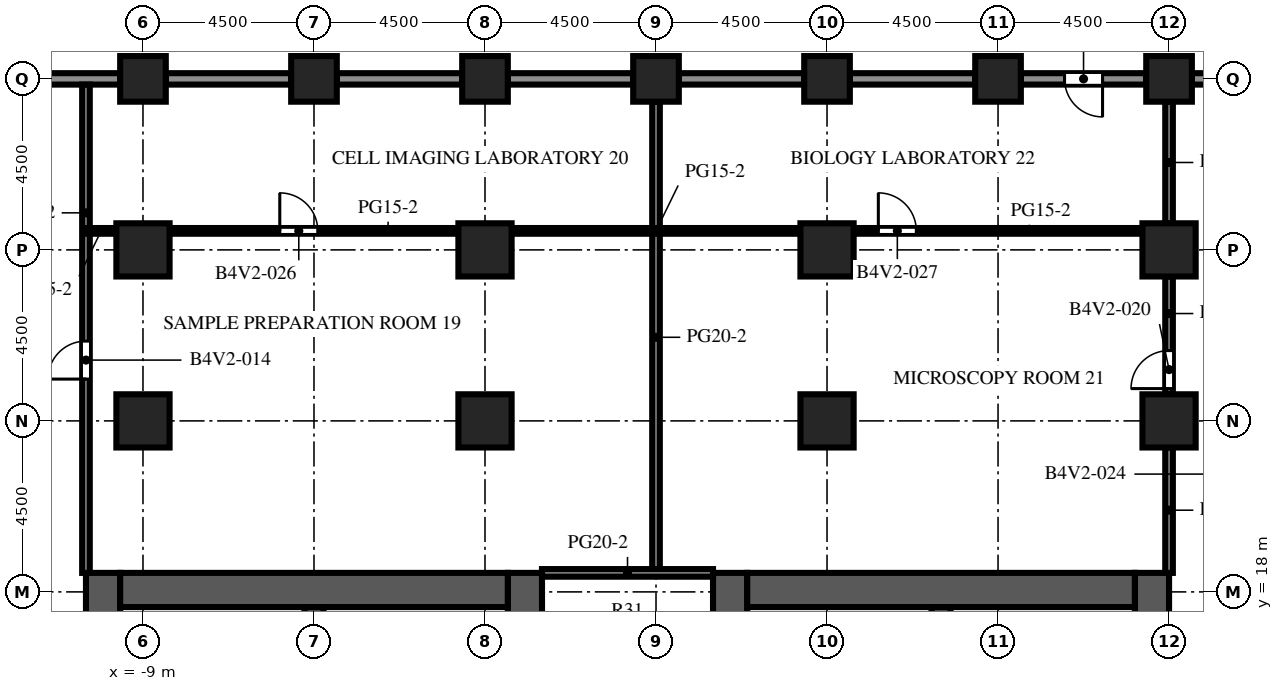
"""IFC4 building model, lengths in metres.
Left out: names, types, materials, properties, quantities, classifications, styles, units other than length and angle.
Written with IfcOpenShell. Run it as: python <this file> out.ifc"""

import sys

from ifc_helpers import new_model, si_unit, direction, frame, frame_2d, origin, origin_2d, place, context, subcontext, project, spatial, rectangle, extrude, element, fill, save


model = new_model("IFC4")
c1 = context("Model", 3, precision=1e-05, world=origin(), true_north=direction((0.0, 1.0)))
c2 = subcontext(c1, "Body", "Model", "MODEL_VIEW")
j1 = project(units=[si_unit("LENGTHUNIT", "METRE"), si_unit("PLANEANGLEUNIT", "RADIAN")], contexts=[c1])
p1 = place(None, origin())
s1 = spatial("IfcSite", under=j1, at=p1, CompositionType="ELEMENT")
p2 = place(p1, origin())
s2 = spatial("IfcBuilding", under=s1, at=p2, CompositionType="ELEMENT")
p3 = place(p2, frame((0.0, 0.0, 141.3)))
s3 = spatial("IfcBuildingStorey", under=s2, at=p3, CompositionType="ELEMENT", Elevation=141.3)
for number, where, z_axis, x_axis in (
    (1, (-9.0, 31.5, 0.0), (0.0, 0.0, 1.0), (1.0, 0.0, 0.0)),
    (2, (-4.5, 31.5, 0.0), (0.0, 0.0, 1.0), (1.0, 0.0, 0.0)),
    (3, (0.0, 31.5, 0.0), (0.0, 0.0, 1.0), (1.0, 0.0, 0.0)),
    (4, (4.5, 31.5, 0.0), (0.0, 0.0, 1.0), (1.0, 0.0, 0.0)),
    (5, (9.0, 31.5, 0.0), (0.0, 0.0, 1.0), (1.0, 0.0, 0.0)),
    (6, (13.5, 31.5, 0.0), (0.0, 0.0, 1.0), (1.0, 0.0, 0.0)),
    (7, (18.0, 31.5, 0.0), (0.0, 0.0, 1.0), (1.0, 0.0, 0.0)),
):
    element("IfcColumn", number, at=place(p3, frame(where, z_axis=z_axis, x_axis=x_axis)), inside=s3, PredefinedType="COLUMN", context=c2, shape_type="SweptSolid", body=[
        extrude(rectangle(XDim=1.2, YDim=1.2, at=origin_2d()), origin(), (0.0, 0.0, 1.0), 4.1),
    ])
for number, where, z_axis, x_axis in (
    (8, (-9.0, 22.5, 0.0), (0.0, 0.0, 1.0), (1.0, 0.0, 0.0)),
    (9, (-9.0, 27.0, 0.0), (0.0, 0.0, 1.0), (1.0, 0.0, 0.0)),
    (10, (0.0, 22.5, 0.0), (0.0, 0.0, 1.0), (1.0, 0.0, 0.0)),
    (11, (0.0, 27.0, 0.0), (0.0, 0.0, 1.0), (1.0, 0.0, 0.0)),
    (12, (9.0, 22.5, 0.0), (0.0, 0.0, 1.0), (1.0, 0.0, 0.0)),
    (13, (9.0, 27.0, 0.0), (0.0, 0.0, 1.0), (1.0, 0.0, 0.0)),
    (14, (18.0, 22.5, 0.0), (0.0, 0.0, 1.0), (1.0, 0.0, 0.0)),
    (15, (18.0, 27.0, 0.0), (0.0, 0.0, 1.0), (1.0, 0.0, 0.0)),
):
    element("IfcColumn", number, at=place(p3, frame(where, z_axis=z_axis, x_axis=x_axis)), inside=s3, PredefinedType="COLUMN", context=c2, shape_type="SweptSolid", body=[
        extrude(rectangle(XDim=1.4, YDim=1.4, at=origin_2d()), origin(), (0.0, 0.0, 1.0), 4.1),
    ])
p4 = place(p3, frame((-10.05, -9.0, 0.0), z_axis=(0.0, 0.0, 1.0), x_axis=(0.0, 1.0, 0.0)))
e16 = element("IfcWall", 16, at=p4, inside=s3, PredefinedType="SHEAR", context=c2, shape_type="SweptSolid", body=[
    extrude(rectangle(XDim=27.5, YDim=0.9, at=frame_2d((13.75, 0.0))), origin(), (0.0, 0.0, 1.0), 4.1),
])
p5 = place(p4, frame((12.55, 0.0, 0.0)))
e17 = element("IfcOpeningElement", 17, at=p5, cuts=e16, PredefinedType="OPENING", context=c2, shape_type="SweptSolid", body=[
    extrude(rectangle(XDim=2.4, YDim=2.4, at=frame_2d((1.2, 1.2))), frame((0.0, 0.46, 0.0), z_axis=(0.0, -1.0, 0.0), x_axis=(1.0, 0.0, 0.0)), (0.0, 0.0, 1.0), 0.92),
])
p6 = place(p4, frame((6.825, 0.0, 0.0)))
e18 = element("IfcOpeningElement", 18, at=p6, cuts=e16, PredefinedType="OPENING", context=c2, shape_type="SweptSolid", body=[
    extrude(rectangle(XDim=1.2, YDim=2.1, at=frame_2d((0.6, 1.05))), frame((0.0, 0.46, 0.0), z_axis=(0.0, -1.0, 0.0), x_axis=(1.0, 0.0, 0.0)), (0.0, 0.0, 1.0), 0.92),
])
p7 = place(p4, frame((19.475, 0.0, 0.0)))
e19 = element("IfcOpeningElement", 19, at=p7, cuts=e16, PredefinedType="OPENING", context=c2, shape_type="SweptSolid", body=[
    extrude(rectangle(XDim=1.2, YDim=2.1, at=frame_2d((0.6, 1.05))), frame((0.0, 0.46, 0.0), z_axis=(0.0, -1.0, 0.0), x_axis=(1.0, 0.0, 0.0)), (0.0, 0.0, 1.0), 0.92),
])
p8 = place(p3, frame((1.05, -9.0, 0.0), z_axis=(0.0, 0.0, 1.0), x_axis=(0.0, 1.0, 0.0)))
e20 = element("IfcWall", 20, at=p8, inside=s3, PredefinedType="SHEAR", context=c2, shape_type="SweptSolid", body=[
    extrude(rectangle(XDim=27.5, YDim=0.9, at=frame_2d((13.75, 0.0))), origin(), (0.0, 0.0, 1.0), 4.1),
])
p9 = place(p8, frame((12.55, 0.0, 0.0)))
e21 = element("IfcOpeningElement", 21, at=p9, cuts=e20, PredefinedType="OPENING", context=c2, shape_type="SweptSolid", body=[
    extrude(rectangle(XDim=2.4, YDim=2.4, at=frame_2d((1.2, 1.2))), frame((0.0, 0.46, 0.0), z_axis=(0.0, -1.0, 0.0), x_axis=(1.0, 0.0, 0.0)), (0.0, 0.0, 1.0), 0.92),
])
p10 = place(p8, frame((5.51, 0.0, 0.0)))
e22 = element("IfcOpeningElement", 22, at=p10, cuts=e20, PredefinedType="OPENING", context=c2, shape_type="SweptSolid", body=[
    extrude(rectangle(XDim=0.923, YDim=2.1, at=frame_2d((0.461, 1.05))), frame((0.0, 0.46, 0.0), z_axis=(0.0, -1.0, 0.0), x_axis=(1.0, 0.0, 0.0)), (0.0, 0.0, 1.0), 0.92),
])
p11 = place(p8, frame((23.427, 0.0, 0.0)))
e23 = element("IfcOpeningElement", 23, at=p11, cuts=e20, PredefinedType="OPENING", context=c2, shape_type="SweptSolid", body=[
    extrude(rectangle(XDim=1.2, YDim=2.1, at=frame_2d((0.6, 1.05))), frame((0.0, 0.46, 0.0), z_axis=(0.0, -1.0, 0.0), x_axis=(1.0, 0.0, 0.0)), (0.0, 0.0, 1.0), 0.92),
])
p12 = place(p3, frame((-9.6, 18.05, 0.0), z_axis=(0.0, 0.0, 1.0), x_axis=(1.0, 0.0, 0.0)))
e24 = element("IfcWall", 24, at=p12, inside=s3, PredefinedType="SHEAR", context=c2, shape_type="SweptSolid", body=[
    extrude(rectangle(XDim=10.2, YDim=0.9, at=frame_2d((5.1, 0.0))), origin(), (0.0, 0.0, 1.0), 4.1),
])
p13 = place(p3, frame((-4.5, 10.25, 0.0), z_axis=(0.0, 0.0, 1.0), x_axis=(0.0, 1.0, 0.0)))
e25 = element("IfcWall", 25, at=p13, inside=s3, PredefinedType="SHEAR", context=c2, shape_type="SweptSolid", body=[
    extrude(rectangle(XDim=7.35, YDim=0.5, at=frame_2d((3.675, 0.0))), origin(), (0.0, 0.0, 1.0), 4.1),
])
p14 = place(p3, frame((6.45, -9.0, 0.0), z_axis=(0.0, 0.0, 1.0), x_axis=(0.0, 1.0, 0.0)))
e26 = element("IfcWall", 26, at=p14, inside=s3, PredefinedType="SHEAR", context=c2, shape_type="SweptSolid", body=[
    extrude(rectangle(XDim=27.5, YDim=0.9, at=frame_2d((13.75, 0.0))), origin(), (0.0, 0.0, 1.0), 4.1),
])
p15 = place(p14, frame((12.55, 0.0, 0.0)))
e27 = element("IfcOpeningElement", 27, at=p15, cuts=e26, PredefinedType="OPENING", context=c2, shape_type="SweptSolid", body=[
    extrude(rectangle(XDim=2.4, YDim=2.4, at=frame_2d((1.2, 1.2))), frame((0.0, 0.46, 0.0), z_axis=(0.0, -1.0, 0.0), x_axis=(1.0, 0.0, 0.0)), (0.0, 0.0, 1.0), 0.92),
])
p16 = place(p14, frame((5.51, 0.0, 0.0)))
e28 = element("IfcOpeningElement", 28, at=p16, cuts=e26, PredefinedType="OPENING", context=c2, shape_type="SweptSolid", body=[
    extrude(rectangle(XDim=0.923, YDim=2.1, at=frame_2d((0.461, 1.05))), frame((0.0, 0.46, 0.0), z_axis=(0.0, -1.0, 0.0), x_axis=(1.0, 0.0, 0.0)), (0.0, 0.0, 1.0), 0.92),
])
p17 = place(p14, frame((23.427, 0.0, 0.0)))
e29 = element("IfcOpeningElement", 29, at=p17, cuts=e26, PredefinedType="OPENING", context=c2, shape_type="SweptSolid", body=[
    extrude(rectangle(XDim=1.2, YDim=2.1, at=frame_2d((0.6, 1.05))), frame((0.0, 0.46, 0.0), z_axis=(0.0, -1.0, 0.0), x_axis=(1.0, 0.0, 0.0)), (0.0, 0.0, 1.0), 0.92),
])
p18 = place(p3, frame((17.55, -9.0, 0.0), z_axis=(0.0, 0.0, 1.0), x_axis=(0.0, 1.0, 0.0)))
e30 = element("IfcWall", 30, at=p18, inside=s3, PredefinedType="SHEAR", context=c2, shape_type="SweptSolid", body=[
    extrude(rectangle(XDim=27.5, YDim=0.9, at=frame_2d((13.75, 0.0))), origin(), (0.0, 0.0, 1.0), 4.1),
])
p19 = place(p18, frame((12.55, 0.0, 0.0)))
e31 = element("IfcOpeningElement", 31, at=p19, cuts=e30, PredefinedType="OPENING", context=c2, shape_type="SweptSolid", body=[
    extrude(rectangle(XDim=2.4, YDim=2.4, at=frame_2d((1.2, 1.2))), frame((0.0, 0.46, 0.0), z_axis=(0.0, -1.0, 0.0), x_axis=(1.0, 0.0, 0.0)), (0.0, 0.0, 1.0), 0.92),
])
p20 = place(p18, frame((6.825, 0.0, 0.0)))
e32 = element("IfcOpeningElement", 32, at=p20, cuts=e30, PredefinedType="OPENING", context=c2, shape_type="SweptSolid", body=[
    extrude(rectangle(XDim=1.2, YDim=2.1, at=frame_2d((0.6, 1.05))), frame((0.0, 0.46, 0.0), z_axis=(0.0, -1.0, 0.0), x_axis=(1.0, 0.0, 0.0)), (0.0, 0.0, 1.0), 0.92),
])
p21 = place(p18, frame((19.475, 0.0, 0.0)))
e33 = element("IfcOpeningElement", 33, at=p21, cuts=e30, PredefinedType="OPENING", context=c2, shape_type="SweptSolid", body=[
    extrude(rectangle(XDim=1.2, YDim=2.1, at=frame_2d((0.6, 1.05))), frame((0.0, 0.46, 0.0), z_axis=(0.0, -1.0, 0.0), x_axis=(1.0, 0.0, 0.0)), (0.0, 0.0, 1.0), 0.92),
])
p22 = place(p3, frame((6.9, 18.05, 0.0), z_axis=(0.0, 0.0, 1.0), x_axis=(1.0, 0.0, 0.0)))
e34 = element("IfcWall", 34, at=p22, inside=s3, PredefinedType="SHEAR", context=c2, shape_type="SweptSolid", body=[
    extrude(rectangle(XDim=10.2, YDim=0.9, at=frame_2d((5.1, 0.0))), origin(), (0.0, 0.0, 1.0), 4.1),
])
p23 = place(p3, frame((12.0, 10.25, 0.0), z_axis=(0.0, 0.0, 1.0), x_axis=(0.0, 1.0, 0.0)))
e35 = element("IfcWall", 35, at=p23, inside=s3, PredefinedType="SHEAR", context=c2, shape_type="SweptSolid", body=[
    extrude(rectangle(XDim=7.35, YDim=0.5, at=frame_2d((3.675, 0.0))), origin(), (0.0, 0.0, 1.0), 4.1),
])
p24 = place(p3, frame((18.6, 31.5, 0.0), z_axis=(0.0, 0.0, 1.0), x_axis=(1.0, 0.0, 0.0)))
e36 = element("IfcWall", 36, at=p24, inside=s3, PredefinedType="SOLIDWALL", context=c2, shape_type="SweptSolid", body=[
    extrude(rectangle(XDim=3.3, YDim=0.3, at=frame_2d((1.65, 0.0))), origin(), (0.0, 0.0, 1.0), 2.6),
])
p25 = place(p3, frame((14.1, 31.5, 0.0), z_axis=(0.0, 0.0, 1.0), x_axis=(1.0, 0.0, 0.0)))
e37 = element("IfcWall", 37, at=p25, inside=s3, PredefinedType="SOLIDWALL", context=c2, shape_type="SweptSolid", body=[
    extrude(rectangle(XDim=3.3, YDim=0.3, at=frame_2d((1.65, 0.0))), origin(), (0.0, 0.0, 1.0), 2.6),
])
p26 = place(p25, frame((1.15, 0.0, 0.0)))
e38 = element("IfcOpeningElement", 38, at=p26, cuts=e37, PredefinedType="OPENING", context=c2, shape_type="SweptSolid", body=[
    extrude(rectangle(XDim=1.0, YDim=2.2, at=frame_2d((0.5, 1.1))), frame((0.0, 0.16, 0.0), z_axis=(0.0, -1.0, 0.0), x_axis=(1.0, 0.0, 0.0)), (0.0, 0.0, 1.0), 0.32),
])
for number, where, z_axis, x_axis in (
    (39, (9.6, 31.5, 0.0), (0.0, 0.0, 1.0), (1.0, 0.0, 0.0)),
    (40, (5.1, 31.5, 0.0), (0.0, 0.0, 1.0), (1.0, 0.0, 0.0)),
    (41, (0.6, 31.5, 0.0), (0.0, 0.0, 1.0), (1.0, 0.0, 0.0)),
    (42, (-3.9, 31.5, 0.0), (0.0, 0.0, 1.0), (1.0, 0.0, 0.0)),
    (43, (-8.4, 31.5, 0.0), (0.0, 0.0, 1.0), (1.0, 0.0, 0.0)),
    (44, (-12.9, 31.5, 0.0), (0.0, 0.0, 1.0), (1.0, 0.0, 0.0)),
):
    element("IfcWall", number, at=place(p3, frame(where, z_axis=z_axis, x_axis=x_axis)), inside=s3, PredefinedType="SOLIDWALL", context=c2, shape_type="SweptSolid", body=[
        extrude(rectangle(XDim=3.3, YDim=0.3, at=frame_2d((1.65, 0.0))), origin(), (0.0, 0.0, 1.0), 2.6),
    ])
p27 = place(p3, frame((-0.7, 15.028, 0.0), z_axis=(0.0, 0.0, 1.0), x_axis=(0.0, 1.0, 0.0)))
e45 = element("IfcWall", 45, at=p27, inside=s3, PredefinedType="PARTITIONING", context=c2, shape_type="SweptSolid", body=[
    extrude(rectangle(XDim=2.573, YDim=0.1, at=frame_2d((1.286, 0.0))), origin(), (0.0, 0.0, 1.0), 3.5),
])
p28 = place(p27, frame((0.786, 0.0, 0.0)))
e46 = element("IfcOpeningElement", 46, at=p28, cuts=e45, PredefinedType="OPENING", context=c2, shape_type="SweptSolid", body=[
    extrude(rectangle(XDim=1.0, YDim=2.1, at=frame_2d((0.5, 1.05))), frame((0.0, 0.06, 0.0), z_axis=(0.0, -1.0, 0.0), x_axis=(1.0, 0.0, 0.0)), (0.0, 0.0, 1.0), 0.12),
])
p29 = place(p3, frame((8.2, 15.028, 0.0), z_axis=(0.0, 0.0, 1.0), x_axis=(0.0, 1.0, 0.0)))
e47 = element("IfcWall", 47, at=p29, inside=s3, PredefinedType="PARTITIONING", context=c2, shape_type="SweptSolid", body=[
    extrude(rectangle(XDim=2.573, YDim=0.1, at=frame_2d((1.286, 0.0))), origin(), (0.0, 0.0, 1.0), 3.5),
])
p30 = place(p29, frame((0.786, 0.0, 0.0)))
e48 = element("IfcOpeningElement", 48, at=p30, cuts=e47, PredefinedType="OPENING", context=c2, shape_type="SweptSolid", body=[
    extrude(rectangle(XDim=1.0, YDim=2.1, at=frame_2d((0.5, 1.05))), frame((0.0, 0.06, 0.0), z_axis=(0.0, -1.0, 0.0), x_axis=(1.0, 0.0, 0.0)), (0.0, 0.0, 1.0), 0.12),
])
p31 = place(p3, frame((-10.5, 31.35, 0.0), z_axis=(0.0, 0.0, 1.0), x_axis=(0.0, -1.0, 0.0)))
e49 = element("IfcWall", 49, at=p31, inside=s3, PredefinedType="PARTITIONING", context=c2, shape_type="SweptSolid", body=[
    extrude(rectangle(XDim=12.85, YDim=0.2, at=frame_2d((6.425, 0.0))), origin(), (0.0, 0.0, 1.0), 3.5),
])
p32 = place(p31, frame((6.75, 0.0, 0.0)))
e50 = element("IfcOpeningElement", 50, at=p32, cuts=e49, PredefinedType="OPENING", context=c2, shape_type="SweptSolid", body=[
    extrude(rectangle(XDim=1.0, YDim=2.1, at=frame_2d((0.5, 1.05))), frame((0.0, 0.11, 0.0), z_axis=(0.0, -1.0, 0.0), x_axis=(1.0, 0.0, 0.0)), (0.0, 0.0, 1.0), 0.22),
])
p33 = place(p3, frame((4.5, 18.5, 0.0), z_axis=(0.0, 0.0, 1.0), x_axis=(0.0, 1.0, 0.0)))
e51 = element("IfcWall", 51, at=p33, inside=s3, PredefinedType="PARTITIONING", context=c2, shape_type="SweptSolid", body=[
    extrude(rectangle(XDim=12.4, YDim=0.2, at=frame_2d((6.2, 0.0))), origin(), (0.0, 0.0, 1.0), 3.5),
])
p34 = place(p3, frame((18.0, 18.5, 0.0), z_axis=(0.0, 0.0, 1.0), x_axis=(0.0, 1.0, 0.0)))
e52 = element("IfcWall", 52, at=p34, inside=s3, PredefinedType="PARTITIONING", context=c2, shape_type="SweptSolid", body=[
    extrude(rectangle(XDim=3.3, YDim=0.2, at=frame_2d((1.65, 0.0))), origin(), (0.0, 0.0, 1.0), 3.5),
])
p35 = place(p3, frame((18.0, 23.2, 0.0), z_axis=(0.0, 0.0, 1.0), x_axis=(0.0, 1.0, 0.0)))
e53 = element("IfcWall", 53, at=p35, inside=s3, PredefinedType="PARTITIONING", context=c2, shape_type="SweptSolid", body=[
    extrude(rectangle(XDim=3.1, YDim=0.2, at=frame_2d((1.55, 0.0))), origin(), (0.0, 0.0, 1.0), 3.5),
])
p36 = place(p35, frame((0.15, 0.0, 0.0)))
e54 = element("IfcOpeningElement", 54, at=p36, cuts=e53, PredefinedType="OPENING", context=c2, shape_type="SweptSolid", body=[
    extrude(rectangle(XDim=1.0, YDim=2.1, at=frame_2d((0.5, 1.05))), frame((0.0, 0.11, 0.0), z_axis=(0.0, -1.0, 0.0), x_axis=(1.0, 0.0, 0.0)), (0.0, 0.0, 1.0), 0.22),
])
p37 = place(p3, frame((18.0, 27.7, 0.0), z_axis=(0.0, 0.0, 1.0), x_axis=(0.0, 1.0, 0.0)))
e55 = element("IfcWall", 55, at=p37, inside=s3, PredefinedType="PARTITIONING", context=c2, shape_type="SweptSolid", body=[
    extrude(rectangle(XDim=3.2, YDim=0.2, at=frame_2d((1.6, 0.0))), origin(), (0.0, 0.0, 1.0), 3.5),
])
p38 = place(p3, frame((1.5, 18.5, 0.0), z_axis=(0.0, 0.0, 1.0), x_axis=(1.0, 0.0, 0.0)))
e56 = element("IfcWall", 56, at=p38, inside=s3, PredefinedType="PARTITIONING", context=c2, shape_type="SweptSolid", body=[
    extrude(rectangle(XDim=4.5, YDim=0.2, at=frame_2d((2.25, 0.0))), origin(), (0.0, 0.0, 1.0), 3.5),
])
p39 = place(p3, frame((-10.5, 27.5, 0.0), z_axis=(0.0, 0.0, 1.0), x_axis=(1.0, 0.0, 0.0)))
e57 = element("IfcWall", 57, at=p39, inside=s3, PredefinedType="PARTITIONING", context=c2, shape_type="SweptSolid", body=[
    extrude(rectangle(XDim=0.8, YDim=0.15, at=frame_2d((0.4, 0.0))), origin(), (0.0, 0.0, 1.0), 3.5),
])
p40 = place(p3, frame((-8.3, 27.5, 0.0), z_axis=(0.0, 0.0, 1.0), x_axis=(1.0, 0.0, 0.0)))
e58 = element("IfcWall", 58, at=p40, inside=s3, PredefinedType="PARTITIONING", context=c2, shape_type="SweptSolid", body=[
    extrude(rectangle(XDim=7.6, YDim=0.15, at=frame_2d((3.8, 0.0))), origin(), (0.0, 0.0, 1.0), 3.5),
])
p41 = place(p40, frame((2.9, 0.0, 0.0)))
e59 = element("IfcOpeningElement", 59, at=p41, cuts=e58, PredefinedType="OPENING", context=c2, shape_type="SweptSolid", body=[
    extrude(rectangle(XDim=1.0, YDim=2.1, at=frame_2d((0.5, 1.05))), frame((0.0, 0.085, 0.0), z_axis=(0.0, -1.0, 0.0), x_axis=(1.0, 0.0, 0.0)), (0.0, 0.0, 1.0), 0.17),
])
p42 = place(p3, frame((0.7, 27.5, 0.0), z_axis=(0.0, 0.0, 1.0), x_axis=(1.0, 0.0, 0.0)))
e60 = element("IfcWall", 60, at=p42, inside=s3, PredefinedType="PARTITIONING", context=c2, shape_type="SweptSolid", body=[
    extrude(rectangle(XDim=7.6, YDim=0.15, at=frame_2d((3.8, 0.0))), origin(), (0.0, 0.0, 1.0), 3.5),
])
p43 = place(p3, frame((9.7, 27.5, 0.0), z_axis=(0.0, 0.0, 1.0), x_axis=(1.0, 0.0, 0.0)))
e61 = element("IfcWall", 61, at=p43, inside=s3, PredefinedType="PARTITIONING", context=c2, shape_type="SweptSolid", body=[
    extrude(rectangle(XDim=7.6, YDim=0.15, at=frame_2d((3.8, 0.0))), origin(), (0.0, 0.0, 1.0), 3.5),
])
p44 = place(p43, frame((0.65, 0.0, 0.0)))
e62 = element("IfcOpeningElement", 62, at=p44, cuts=e61, PredefinedType="OPENING", context=c2, shape_type="SweptSolid", body=[
    extrude(rectangle(XDim=1.0, YDim=2.1, at=frame_2d((0.5, 1.05))), frame((0.0, 0.085, 0.0), z_axis=(0.0, -1.0, 0.0), x_axis=(1.0, 0.0, 0.0)), (0.0, 0.0, 1.0), 0.17),
])
p45 = place(p26, origin())
e63 = element("IfcDoor", 63, at=p45, inside=s3, OperationType="SINGLE_SWING_RIGHT", PredefinedType="DOOR", context=c2, shape_type="SweptSolid", body=[
    extrude(rectangle(XDim=1.0, YDim=2.2, at=frame_2d((0.5, 1.1))), frame((0.0, 0.025, 0.0), z_axis=(0.0, -1.0, 0.0), x_axis=(1.0, 0.0, 0.0)), (0.0, 0.0, 1.0), 0.05),
])
fill(e38, e63)
p46 = place(p32, origin())
e64 = element("IfcDoor", 64, at=p46, inside=s3, OperationType="SINGLE_SWING_RIGHT", PredefinedType="DOOR", context=c2, shape_type="SweptSolid", body=[
    extrude(rectangle(XDim=1.0, YDim=2.1, at=frame_2d((0.5, 1.05))), frame((0.0, 0.025, 0.0), z_axis=(0.0, -1.0, 0.0), x_axis=(1.0, 0.0, 0.0)), (0.0, 0.0, 1.0), 0.05),
])
fill(e50, e64)
p47 = place(p36, origin())
e65 = element("IfcDoor", 65, at=p47, inside=s3, OperationType="SINGLE_SWING_LEFT", PredefinedType="DOOR", context=c2, shape_type="SweptSolid", body=[
    extrude(rectangle(XDim=1.0, YDim=2.1, at=frame_2d((0.5, 1.05))), frame((0.0, 0.025, 0.0), z_axis=(0.0, -1.0, 0.0), x_axis=(1.0, 0.0, 0.0)), (0.0, 0.0, 1.0), 0.05),
])
fill(e54, e65)
p48 = place(p41, origin())
e66 = element("IfcDoor", 66, at=p48, inside=s3, OperationType="SINGLE_SWING_LEFT", PredefinedType="DOOR", context=c2, shape_type="SweptSolid", body=[
    extrude(rectangle(XDim=1.0, YDim=2.1, at=frame_2d((0.5, 1.05))), frame((0.0, 0.025, 0.0), z_axis=(0.0, -1.0, 0.0), x_axis=(1.0, 0.0, 0.0)), (0.0, 0.0, 1.0), 0.05),
])
fill(e59, e66)
p49 = place(p44, origin())
e67 = element("IfcDoor", 67, at=p49, inside=s3, OperationType="SINGLE_SWING_LEFT", PredefinedType="DOOR", context=c2, shape_type="SweptSolid", body=[
    extrude(rectangle(XDim=1.0, YDim=2.1, at=frame_2d((0.5, 1.05))), frame((0.0, 0.025, 0.0), z_axis=(0.0, -1.0, 0.0), x_axis=(1.0, 0.0, 0.0)), (0.0, 0.0, 1.0), 0.05),
])
fill(e62, e67)
save(model, sys.argv[1])
